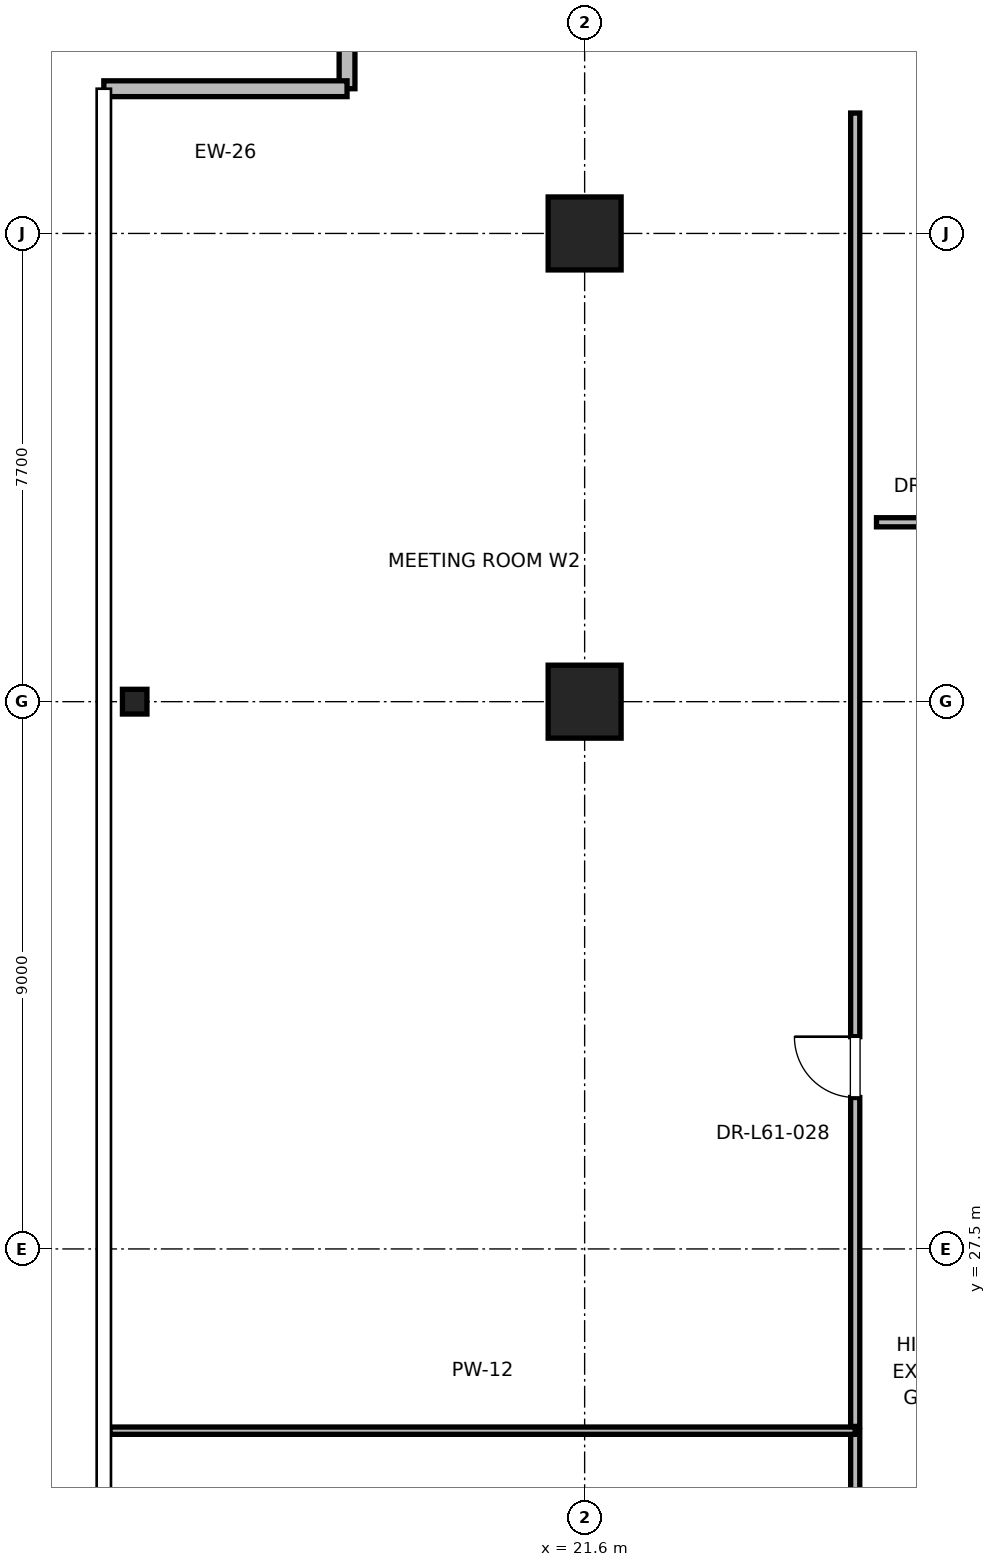
"""IFC4 building model, lengths in metres.
Left out: names, types, materials, properties, quantities, classifications, styles, units other than length and angle.
Written with IfcOpenShell. Run it as: python <this file> out.ifc"""

import sys

from ifc_helpers import new_model, si_unit, direction, frame, frame_2d, origin, origin_2d, place, context, subcontext, project, spatial, rectangle, i_section, extrude, element, fill, save


model = new_model("IFC4")
c1 = context("Model", 3, precision=1e-05, world=origin(), true_north=direction((0.0, 1.0)))
c2 = subcontext(c1, "Body", "Model", "MODEL_VIEW")
j1 = project(units=[si_unit("LENGTHUNIT", "METRE"), si_unit("PLANEANGLEUNIT", "RADIAN")], contexts=[c1])
p1 = place(None, origin())
s1 = spatial("IfcSite", under=j1, at=p1, CompositionType="ELEMENT")
p2 = place(p1, origin())
s2 = spatial("IfcBuilding", under=s1, at=p2, CompositionType="ELEMENT")
p3 = place(p2, frame((0.0, 0.0, 263.2)))
s3 = spatial("IfcBuildingStorey", under=s2, at=p3, CompositionType="ELEMENT", Elevation=263.2)
for number, where, z_axis, x_axis in (
    (1, (21.6, 36.5, 0.0), (0.0, 0.0, 1.0), (1.0, 0.0, 0.0)),
    (2, (21.6, 44.2, 0.0), (0.0, 0.0, 1.0), (1.0, 0.0, 0.0)),
):
    element("IfcColumn", number, at=place(p3, frame(where, z_axis=z_axis, x_axis=x_axis)), inside=s3, PredefinedType="COLUMN", context=c2, shape_type="SweptSolid", body=[
        extrude(rectangle(XDim=1.2, YDim=1.2, at=origin_2d()), origin(), (0.0, 0.0, 1.0), 4.0),
    ])
p4 = place(p3, frame((14.2, 36.5, 0.0), z_axis=(0.0, 0.0, 1.0), x_axis=(1.0, 0.0, 0.0)))
e3 = element("IfcColumn", 3, at=p4, inside=s3, PredefinedType="COLUMN", context=c2, shape_type="SweptSolid", body=[
    extrude(i_section(OverallWidth=0.403, OverallDepth=0.406, WebThickness=0.027, FlangeThickness=0.043, FilletRadius=0.015, at=origin_2d()), origin(), (0.0, 0.0, 1.0), 4.0),
])
p5 = place(p3, frame((17.692, 50.08, 0.0), z_axis=(0.0, 0.0, 1.0), x_axis=(0.0, -1.0, 0.0)))
e4 = element("IfcWall", 4, at=p5, inside=s3, PredefinedType="PARAPET", context=c2, shape_type="SweptSolid", body=[
    extrude(rectangle(XDim=3.5, YDim=0.26, at=frame_2d((1.75, 0.0))), origin(), (0.0, 0.0, 1.0), 3.785),
])
p6 = place(p5, frame((1.05, 0.0, 0.85)))
e5 = element("IfcOpeningElement", 5, at=p6, cuts=e4, PredefinedType="OPENING", context=c2, shape_type="SweptSolid", body=[
    extrude(rectangle(XDim=1.4, YDim=2.0, at=frame_2d((0.7, 1.0))), frame((0.0, 0.13, 0.0), z_axis=(0.0, -1.0, 0.0), x_axis=(1.0, 0.0, 0.0)), (0.0, 0.0, 1.0), 0.26),
])
p7 = place(p3, frame((17.692, 46.58, 0.0), z_axis=(0.0, 0.0, 1.0), x_axis=(-1.0, 0.0, 0.0)))
e6 = element("IfcWall", 6, at=p7, inside=s3, PredefinedType="PARAPET", context=c2, shape_type="SweptSolid", body=[
    extrude(rectangle(XDim=4.0, YDim=0.26, at=frame_2d((2.0, 0.0))), origin(), (0.0, 0.0, 1.0), 3.785),
])
p8 = place(p3, frame((26.4, 39.45, 0.0), z_axis=(0.0, 0.0, 1.0), x_axis=(1.0, 0.0, 0.0)))
e7 = element("IfcWall", 7, at=p8, inside=s3, PredefinedType="PARTITIONING", context=c2, shape_type="SweptSolid", body=[
    extrude(rectangle(XDim=6.528, YDim=0.15, at=frame_2d((3.264, 0.0))), origin(), (0.0, 0.0, 1.0), 2.85),
])
p9 = place(p8, frame((2.779, 0.0, 0.0)))
e8 = element("IfcOpeningElement", 8, at=p9, cuts=e7, PredefinedType="OPENING", context=c2, shape_type="SweptSolid", body=[
    extrude(rectangle(XDim=1.0, YDim=2.15, at=frame_2d((0.5, 1.075))), frame((0.0, 0.075, 0.0), z_axis=(0.0, -1.0, 0.0), x_axis=(1.0, 0.0, 0.0)), (0.0, 0.0, 1.0), 0.15),
])
p10 = place(p3, frame((26.05, 8.82, 0.0), z_axis=(0.0, 0.0, 1.0), x_axis=(0.0, 1.0, 0.0)))
e9 = element("IfcWall", 9, at=p10, inside=s3, PredefinedType="PARTITIONING", context=c2, shape_type="SweptSolid", body=[
    extrude(rectangle(XDim=15.691, YDim=0.15, at=frame_2d((7.846, 0.0))), origin(), (0.0, 0.0, 1.0), 2.85),
])
p11 = place(p10, frame((11.951, 0.0, 0.0)))
e10 = element("IfcOpeningElement", 10, at=p11, cuts=e9, PredefinedType="OPENING", context=c2, shape_type="SweptSolid", body=[
    extrude(rectangle(XDim=1.5, YDim=2.25, at=frame_2d((0.75, 1.125))), frame((0.0, 0.075, 0.0), z_axis=(0.0, -1.0, 0.0), x_axis=(1.0, 0.0, 0.0)), (0.0, 0.0, 1.0), 0.15),
])
p12 = place(p3, frame((13.792, 24.511, 0.0), z_axis=(0.0, 0.0, 1.0), x_axis=(1.0, 0.0, 0.0)))
e11 = element("IfcWall", 11, at=p12, inside=s3, PredefinedType="PARTITIONING", context=c2, shape_type="SweptSolid", body=[
    extrude(rectangle(XDim=12.258, YDim=0.12, at=frame_2d((6.129, 0.0))), origin(), (0.0, 0.0, 1.0), 2.85),
])
p13 = place(p3, frame((26.05, 24.581, 0.0), z_axis=(0.0, 0.0, 1.0), x_axis=(0.0, 1.0, 0.0)))
e12 = element("IfcWall", 12, at=p13, inside=s3, PredefinedType="PARTITIONING", context=c2, shape_type="SweptSolid", body=[
    extrude(rectangle(XDim=21.599, YDim=0.15, at=frame_2d((10.799, 0.0))), origin(), (0.0, 0.0, 1.0), 2.85),
])
p14 = place(p13, frame((5.409, 0.0, 0.0)))
e13 = element("IfcOpeningElement", 13, at=p14, cuts=e12, PredefinedType="OPENING", context=c2, shape_type="SweptSolid", body=[
    extrude(rectangle(XDim=1.0, YDim=2.15, at=frame_2d((0.5, 1.075))), frame((0.0, 0.075, 0.0), z_axis=(0.0, -1.0, 0.0), x_axis=(1.0, 0.0, 0.0)), (0.0, 0.0, 1.0), 0.15),
])
p15 = place(p14, origin())
e14 = element("IfcDoor", 14, at=p15, inside=s3, OperationType="SINGLE_SWING_RIGHT", PredefinedType="DOOR", context=c2, shape_type="SweptSolid", body=[
    extrude(rectangle(XDim=1.0, YDim=2.15, at=frame_2d((0.5, 1.075))), frame((0.0, 0.025, 0.0), z_axis=(0.0, -1.0, 0.0), x_axis=(1.0, 0.0, 0.0)), (0.0, 0.0, 1.0), 0.05),
])
fill(e13, e14)
save(model, sys.argv[1])
